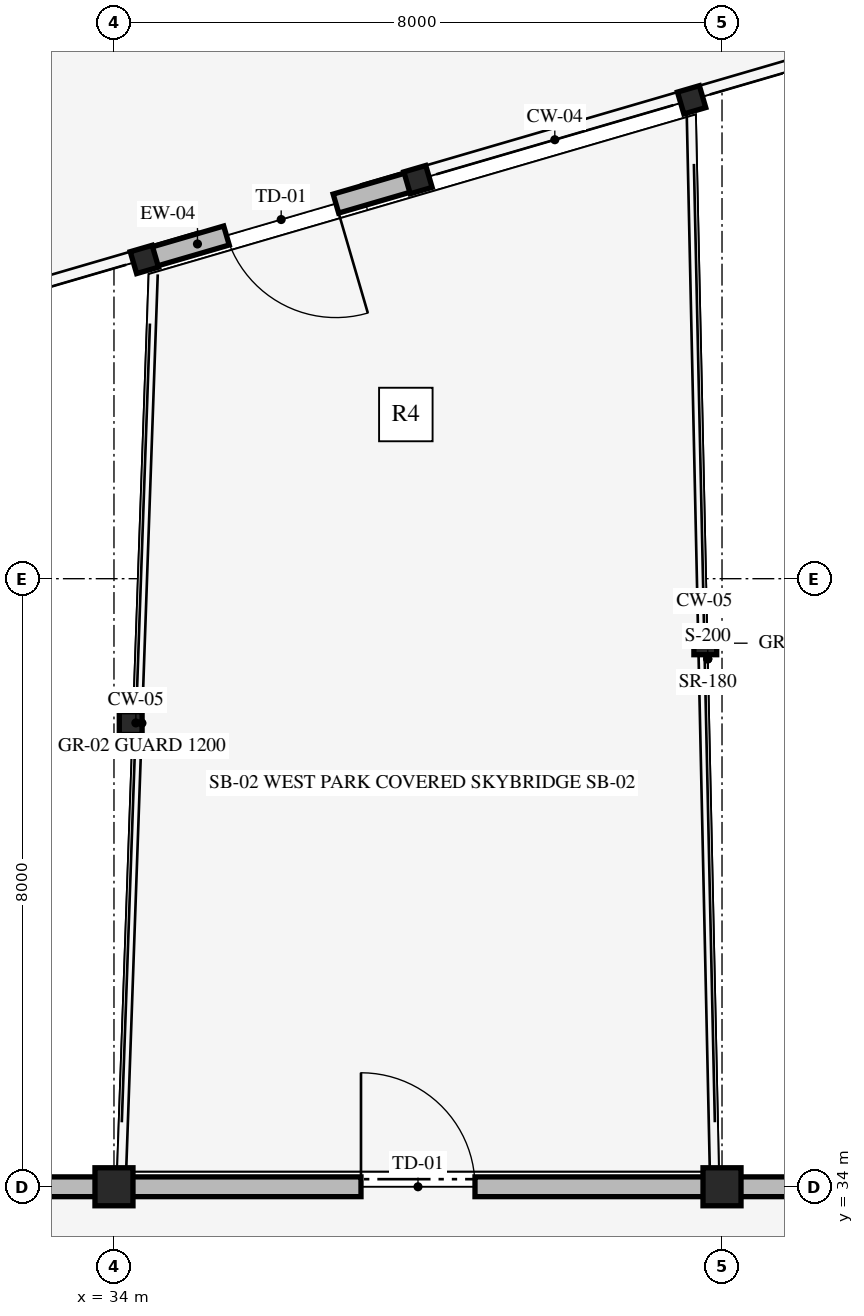
"""IFC4 building model, lengths in metres.
Left out: names, types, materials, properties, quantities, classifications, styles, units other than length and angle.
Written with IfcOpenShell. Run it as: python <this file> out.ifc"""

import sys

from ifc_helpers import new_model, si_unit, direction, frame, frame_2d, origin, origin_2d, place, context, subcontext, project, spatial, rectangle, hollow_rectangle, i_section, extrude, element, fill, save


model = new_model("IFC4")
c1 = context("Model", 3, precision=1e-05, world=origin(), true_north=direction((0.0, 1.0)))
c2 = subcontext(c1, "Body", "Model", "MODEL_VIEW")
j1 = project(units=[si_unit("LENGTHUNIT", "METRE"), si_unit("PLANEANGLEUNIT", "RADIAN")], contexts=[c1])
p1 = place(None, origin())
s1 = spatial("IfcSite", under=j1, at=p1, CompositionType="ELEMENT")
p2 = place(p1, origin())
s2 = spatial("IfcBuilding", under=s1, at=p2, CompositionType="ELEMENT")
p3 = place(p2, frame((0.0, 0.0, 5.4)))
s3 = spatial("IfcBuildingStorey", under=s2, at=p3, CompositionType="ELEMENT", Elevation=5.4)
for number, where, z_axis, x_axis in (
    (1, (34.22, 40.1, 0.0), (0.0, 0.0, 1.0), (1.0, 0.0, 0.0)),
    (2, (41.78, 41.15, 0.0), (0.0, 0.0, 1.0), (1.0, 0.0, 0.0)),
):
    element("IfcColumn", number, at=place(p3, frame(where, z_axis=z_axis, x_axis=x_axis)), inside=s3, PredefinedType="COLUMN", context=c2, shape_type="SweptSolid", body=[
        extrude(i_section(OverallWidth=0.3, OverallDepth=0.3, WebThickness=0.01, FlangeThickness=0.015, FilletRadius=0.018, at=origin_2d()), origin(), (0.0, 0.0, 1.0), 3.17),
    ])
for number, where, z_axis, x_axis in (
    (3, (34.0, 34.0, 0.0), (0.0, 0.0, 1.0), (1.0, 0.0, 0.0)),
    (4, (42.0, 34.0, 0.0), (0.0, 0.0, 1.0), (1.0, 0.0, 0.0)),
):
    element("IfcColumn", number, at=place(p3, frame(where, z_axis=z_axis, x_axis=x_axis)), inside=s3, PredefinedType="COLUMN", context=c2, shape_type="SweptSolid", body=[
        extrude(rectangle(XDim=0.5, YDim=0.5, at=origin_2d()), origin(), (0.0, 0.0, 1.0), 4.8),
    ])
p4 = place(p3, frame((34.4, 46.2, 0.0), z_axis=(0.0, 0.0, 1.0), x_axis=(0.960000000041, 0.279999999861, 0.0)))
e5 = element("IfcColumn", 5, at=p4, inside=s3, PredefinedType="COLUMN", context=c2, shape_type="SweptSolid", body=[
    extrude(hollow_rectangle(XDim=0.3, YDim=0.3, WallThickness=0.01, at=origin_2d()), origin(), (0.0, 0.0, 1.0), 4.6),
])
p5 = place(p3, frame((38.0, 47.25, 0.0), z_axis=(0.0, 0.0, 1.0), x_axis=(0.960000000041, 0.279999999861, 0.0)))
e6 = element("IfcColumn", 6, at=p5, inside=s3, PredefinedType="COLUMN", context=c2, shape_type="SweptSolid", body=[
    extrude(hollow_rectangle(XDim=0.3, YDim=0.3, WallThickness=0.01, at=origin_2d()), origin(), (0.0, 0.0, 1.0), 4.85),
])
p6 = place(p3, frame((41.6, 48.3, 0.0), z_axis=(0.0, 0.0, 1.0), x_axis=(0.960000000041, 0.279999999861, 0.0)))
e7 = element("IfcColumn", 7, at=p6, inside=s3, PredefinedType="COLUMN", context=c2, shape_type="SweptSolid", body=[
    extrude(hollow_rectangle(XDim=0.3, YDim=0.3, WallThickness=0.01, at=origin_2d()), origin(), (0.0, 0.0, 1.0), 5.1),
])
p7 = place(p3, frame((26.0, 34.0, 0.0), z_axis=(0.0, 0.0, 1.0), x_axis=(1.0, 0.0, 0.0)))
e8 = element("IfcWall", 8, at=p7, inside=s3, PredefinedType="STANDARD", context=c2, shape_type="SweptSolid", body=[
    extrude(rectangle(XDim=8.0, YDim=0.26, at=frame_2d((4.0, 0.0))), origin(), (0.0, 0.0, 1.0), 3.94),
])
p8 = place(p7, frame((3.4, 0.0, 0.85)))
e9 = element("IfcOpeningElement", 9, at=p8, cuts=e8, PredefinedType="OPENING", context=c2, shape_type="SweptSolid", body=[
    extrude(rectangle(XDim=1.2, YDim=1.8, at=frame_2d((0.6, 0.9))), frame((0.0, 0.14, 0.0), z_axis=(0.0, -1.0, 0.0), x_axis=(1.0, 0.0, 0.0)), (0.0, 0.0, 1.0), 0.28),
])
p9 = place(p3, frame((34.0, 34.0, 0.0), z_axis=(0.0, 0.0, 1.0), x_axis=(1.0, 0.0, 0.0)))
e10 = element("IfcWall", 10, at=p9, inside=s3, PredefinedType="STANDARD", context=c2, shape_type="SweptSolid", body=[
    extrude(rectangle(XDim=8.0, YDim=0.26, at=frame_2d((4.0, 0.0))), origin(), (0.0, 0.0, 1.0), 3.94),
])
p10 = place(p9, frame((3.25, 0.0, 0.0)))
e11 = element("IfcOpeningElement", 11, at=p10, cuts=e10, PredefinedType="OPENING", context=c2, shape_type="SweptSolid", body=[
    extrude(rectangle(XDim=1.5, YDim=2.25, at=frame_2d((0.75, 1.125))), frame((0.0, 0.14, 0.0), z_axis=(0.0, -1.0, 0.0), x_axis=(1.0, 0.0, 0.0)), (0.0, 0.0, 1.0), 0.28),
])
p11 = place(p3, frame((42.0, 34.0, 0.0), z_axis=(0.0, 0.0, 1.0), x_axis=(1.0, 0.0, 0.0)))
e12 = element("IfcWall", 12, at=p11, inside=s3, PredefinedType="STANDARD", context=c2, shape_type="SweptSolid", body=[
    extrude(rectangle(XDim=8.0, YDim=0.26, at=frame_2d((4.0, 0.0))), origin(), (0.0, 0.0, 1.0), 3.94),
])
p12 = place(p11, frame((3.5, 0.0, 0.85)))
e13 = element("IfcOpeningElement", 13, at=p12, cuts=e12, PredefinedType="OPENING", context=c2, shape_type="SweptSolid", body=[
    extrude(rectangle(XDim=1.0, YDim=1.5, at=frame_2d((0.5, 0.75))), frame((0.0, 0.14, 0.0), z_axis=(0.0, -1.0, 0.0), x_axis=(1.0, 0.0, 0.0)), (0.0, 0.0, 1.0), 0.28),
])
p13 = place(p3, frame((38.0, 47.25, 0.0), z_axis=(0.0, 0.0, 1.0), x_axis=(-0.959998541695, -0.280004999853, 0.0)))
e14 = element("IfcWall", 14, at=p13, inside=s3, PredefinedType="STANDARD", context=c2, shape_type="SweptSolid", body=[
    extrude(rectangle(XDim=3.75, YDim=0.26, at=frame_2d((1.875, 0.0))), origin(), (0.0, 0.0, 1.0), 3.1),
])
p14 = place(p13, frame((1.125, 0.0, 0.0)))
e15 = element("IfcOpeningElement", 15, at=p14, cuts=e14, PredefinedType="OPENING", context=c2, shape_type="SweptSolid", body=[
    extrude(rectangle(XDim=1.5, YDim=2.25, at=frame_2d((0.75, 1.125))), frame((0.0, 0.14, 0.0), z_axis=(0.0, -1.0, 0.0), x_axis=(1.0, 0.0, 0.0)), (0.0, 0.0, 1.0), 0.28),
])
p15 = place(p10, origin())
e16 = element("IfcDoor", 16, at=p15, inside=s3, OperationType="SINGLE_SWING_LEFT", PredefinedType="DOOR", context=c2, shape_type="SweptSolid", body=[
    extrude(rectangle(XDim=1.5, YDim=2.25, at=frame_2d((0.75, 1.125))), frame((0.0, 0.025, 0.0), z_axis=(0.0, -1.0, 0.0), x_axis=(1.0, 0.0, 0.0)), (0.0, 0.0, 1.0), 0.05),
])
fill(e11, e16)
p16 = place(p14, origin())
e17 = element("IfcDoor", 17, at=p16, inside=s3, OperationType="SINGLE_SWING_LEFT", PredefinedType="DOOR", context=c2, shape_type="SweptSolid", body=[
    extrude(rectangle(XDim=1.5, YDim=2.25, at=frame_2d((0.75, 1.125))), frame((0.0, 0.025, 0.0), z_axis=(0.0, -1.0, 0.0), x_axis=(1.0, 0.0, 0.0)), (0.0, 0.0, 1.0), 0.05),
])
fill(e15, e17)
save(model, sys.argv[1])
